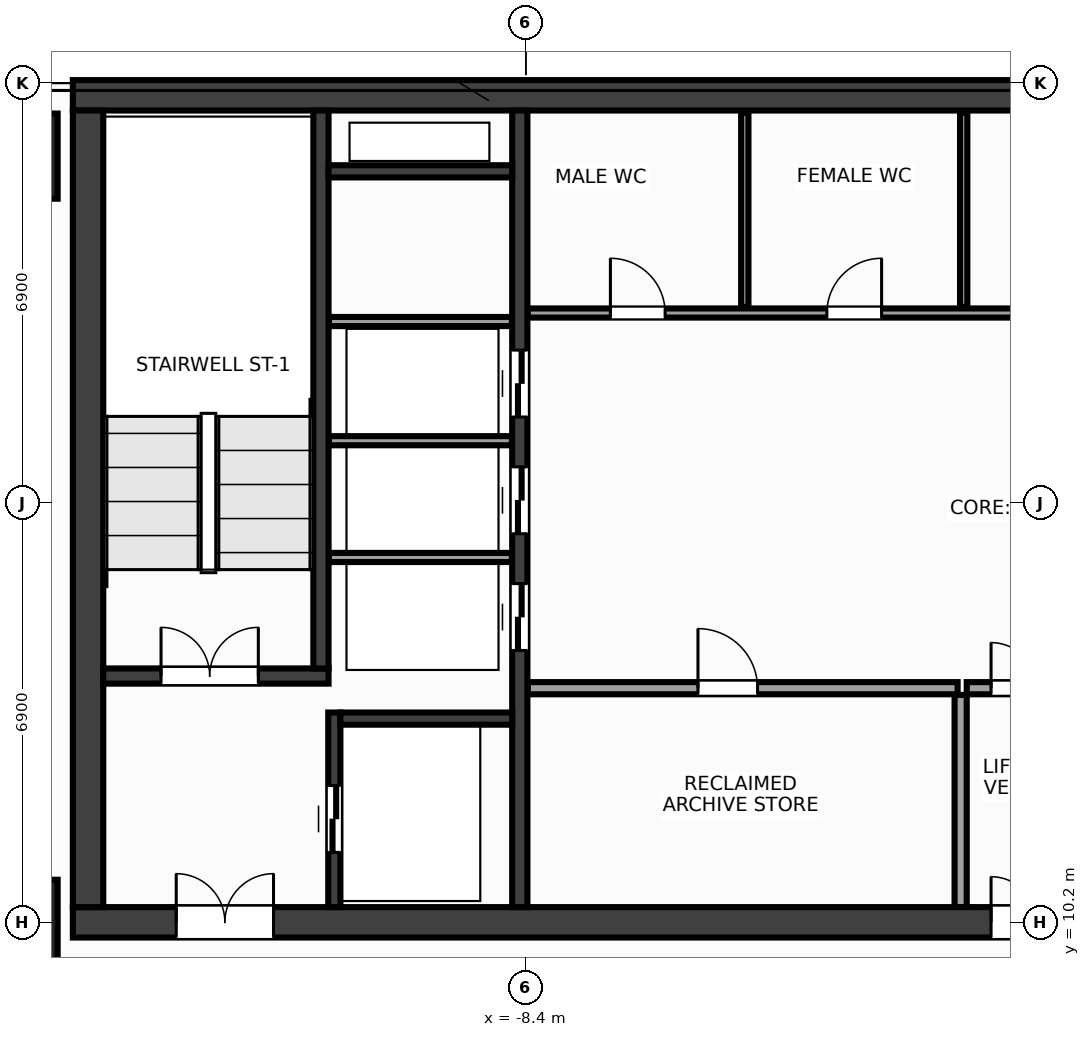
"""IFC4 building model, lengths in metres.
Left out: names, types, materials, properties, quantities, classifications, styles, units other than length and angle.
Written with IfcOpenShell. Run it as: python <this file> out.ifc"""

import sys

from ifc_helpers import new_model, si_unit, direction, frame, frame_2d, origin, origin_2d, place, context, subcontext, project, spatial, rectangle, extrude, source, transform, mapped, element, fill, save


model = new_model("IFC4")
c1 = context("Model", 3, precision=1e-05, world=origin(), true_north=direction((0.0, 1.0)))
c2 = subcontext(c1, "Body", "Model", "MODEL_VIEW")
j1 = project(units=[si_unit("LENGTHUNIT", "METRE"), si_unit("PLANEANGLEUNIT", "RADIAN")], contexts=[c1])
p1 = place(None, origin())
s1 = spatial("IfcSite", under=j1, at=p1, CompositionType="ELEMENT")
p2 = place(p1, origin())
s2 = spatial("IfcBuilding", under=s1, at=p2, CompositionType="ELEMENT")
p3 = place(p2, frame((0.0, 0.0, 200.0)))
s3 = spatial("IfcBuildingStorey", under=s2, at=p3, CompositionType="ELEMENT", Elevation=200.0)
m1 = source(origin(), c2, "Body", "SweptSolid", [
    extrude(rectangle(XDim=31.7, YDim=0.5, at=frame_2d((15.85, 0.0))), origin(), (0.0, 0.0, 1.0), 3.6),
])
p4 = place(p3, frame((-15.85, 23.8, 0.0), z_axis=(0.0, 0.0, 1.0), x_axis=(1.0, 0.0, 0.0)))
e1 = element("IfcWall", 1, at=p4, inside=s3, PredefinedType="SHEAR", context=c2, shape_type="MappedRepresentation", body=[
    mapped(m1, transform((0.0, 0.0, 0.0), x_axis=(1.0, 0.0, 0.0), y_axis=(0.0, 1.0, 0.0), z_axis=(0.0, 0.0, 1.0), scale=1.0)),
])
p5 = place(p3, frame((-15.85, 10.2, 0.0), z_axis=(0.0, 0.0, 1.0), x_axis=(1.0, 0.0, 0.0)))
e2 = element("IfcWall", 2, at=p5, inside=s3, PredefinedType="SHEAR", context=c2, shape_type="MappedRepresentation", body=[
    mapped(m1, transform((0.0, 0.0, 0.0), x_axis=(1.0, 0.0, 0.0), y_axis=(0.0, 1.0, 0.0), z_axis=(0.0, 0.0, 1.0), scale=1.0)),
])
p6 = place(p5, frame((1.7, 0.0, 0.0)))
e3 = element("IfcOpeningElement", 3, at=p6, cuts=e2, PredefinedType="OPENING", context=c2, shape_type="SweptSolid", body=[
    extrude(rectangle(XDim=1.6, YDim=2.15, at=frame_2d((0.8, 1.075))), frame((0.0, 0.262, 0.0), z_axis=(0.0, -1.0, 0.0), x_axis=(1.0, 0.0, 0.0)), (0.0, 0.0, 1.0), 0.524),
])
p7 = place(p5, frame((28.4, 0.0, 0.0)))
e4 = element("IfcOpeningElement", 4, at=p7, cuts=e2, PredefinedType="OPENING", context=c2, shape_type="SweptSolid", body=[
    extrude(rectangle(XDim=1.6, YDim=2.15, at=frame_2d((0.8, 1.075))), frame((0.0, 0.262, 0.0), z_axis=(0.0, -1.0, 0.0), x_axis=(1.0, 0.0, 0.0)), (0.0, 0.0, 1.0), 0.524),
])
p8 = place(p5, frame((15.1, 0.0, 0.0)))
e5 = element("IfcOpeningElement", 5, at=p8, cuts=e2, PredefinedType="OPENING", context=c2, shape_type="SweptSolid", body=[
    extrude(rectangle(XDim=1.5, YDim=2.2, at=frame_2d((0.75, 1.1))), frame((0.0, 0.262, 0.0), z_axis=(0.0, -1.0, 0.0), x_axis=(1.0, 0.0, 0.0)), (0.0, 0.0, 1.0), 0.524),
])
m2 = source(origin(), c2, "Body", "SweptSolid", [
    extrude(rectangle(XDim=13.1, YDim=0.5, at=frame_2d((6.55, 0.0))), origin(), (0.0, 0.0, 1.0), 3.6),
])
p9 = place(p3, frame((-15.6, 10.45, 0.0), z_axis=(0.0, 0.0, 1.0), x_axis=(0.0, 1.0, 0.0)))
e6 = element("IfcWall", 6, at=p9, inside=s3, PredefinedType="SHEAR", context=c2, shape_type="MappedRepresentation", body=[
    mapped(m2, transform((0.0, 0.0, 0.0), x_axis=(1.0, 0.0, 0.0), y_axis=(0.0, 1.0, 0.0), z_axis=(0.0, 0.0, 1.0), scale=1.0)),
])
m3 = source(origin(), c2, "Body", "SweptSolid", [
    extrude(rectangle(XDim=13.1, YDim=0.25, at=frame_2d((6.55, 0.0))), origin(), (0.0, 0.0, 1.0), 3.6),
])
p10 = place(p3, frame((-8.5, 10.45, 0.0), z_axis=(0.0, 0.0, 1.0), x_axis=(0.0, 1.0, 0.0)))
e7 = element("IfcWall", 7, at=p10, inside=s3, PredefinedType="SHEAR", context=c2, shape_type="MappedRepresentation", body=[
    mapped(m3, transform((0.0, 0.0, 0.0), x_axis=(1.0, 0.0, 0.0), y_axis=(0.0, 1.0, 0.0), z_axis=(0.0, 0.0, 1.0), scale=1.0)),
])
p11 = place(p10, frame((4.22, 0.0, 0.0)))
e8 = element("IfcOpeningElement", 8, at=p11, cuts=e7, PredefinedType="OPENING", context=c2, shape_type="SweptSolid", body=[
    extrude(rectangle(XDim=1.1, YDim=2.15, at=frame_2d((0.55, 1.075))), frame((0.0, 0.137, 0.0), z_axis=(0.0, -1.0, 0.0), x_axis=(1.0, 0.0, 0.0)), (0.0, 0.0, 1.0), 0.274),
])
p12 = place(p10, frame((6.14, 0.0, 0.0)))
e9 = element("IfcOpeningElement", 9, at=p12, cuts=e7, PredefinedType="OPENING", context=c2, shape_type="SweptSolid", body=[
    extrude(rectangle(XDim=1.1, YDim=2.15, at=frame_2d((0.55, 1.075))), frame((0.0, 0.137, 0.0), z_axis=(0.0, -1.0, 0.0), x_axis=(1.0, 0.0, 0.0)), (0.0, 0.0, 1.0), 0.274),
])
p13 = place(p10, frame((8.06, 0.0, 0.0)))
e10 = element("IfcOpeningElement", 10, at=p13, cuts=e7, PredefinedType="OPENING", context=c2, shape_type="SweptSolid", body=[
    extrude(rectangle(XDim=1.1, YDim=2.15, at=frame_2d((0.55, 1.075))), frame((0.0, 0.137, 0.0), z_axis=(0.0, -1.0, 0.0), x_axis=(1.0, 0.0, 0.0)), (0.0, 0.0, 1.0), 0.274),
])
m4 = source(origin(), c2, "Body", "SweptSolid", [
    extrude(rectangle(XDim=3.705, YDim=0.25, at=frame_2d((1.853, 0.0))), origin(), (0.0, 0.0, 1.0), 3.6),
])
p14 = place(p3, frame((-15.35, 14.25, 0.0), z_axis=(0.0, 0.0, 1.0), x_axis=(1.0, 0.0, 0.0)))
e11 = element("IfcWall", 11, at=p14, inside=s3, PredefinedType="SHEAR", context=c2, shape_type="MappedRepresentation", body=[
    mapped(m4, transform((0.0, 0.0, 0.0), x_axis=(1.0, 0.0, 0.0), y_axis=(0.0, 1.0, 0.0), z_axis=(0.0, 0.0, 1.0), scale=1.0)),
])
p15 = place(p14, frame((0.95, 0.0, 0.0)))
e12 = element("IfcOpeningElement", 12, at=p15, cuts=e11, PredefinedType="OPENING", context=c2, shape_type="SweptSolid", body=[
    extrude(rectangle(XDim=1.6, YDim=2.15, at=frame_2d((0.8, 1.075))), frame((0.0, 0.137, 0.0), z_axis=(0.0, -1.0, 0.0), x_axis=(1.0, 0.0, 0.0)), (0.0, 0.0, 1.0), 0.274),
])
m5 = source(origin(), c2, "Body", "SweptSolid", [
    extrude(rectangle(XDim=9.175, YDim=0.25, at=frame_2d((4.587, 0.0))), origin(), (0.0, 0.0, 1.0), 3.6),
])
p16 = place(p3, frame((-11.77, 14.375, 0.0), z_axis=(0.0, 0.0, 1.0), x_axis=(0.0, 1.0, 0.0)))
e13 = element("IfcWall", 13, at=p16, inside=s3, PredefinedType="SHEAR", context=c2, shape_type="MappedRepresentation", body=[
    mapped(m5, transform((0.0, 0.0, 0.0), x_axis=(1.0, 0.0, 0.0), y_axis=(0.0, 1.0, 0.0), z_axis=(0.0, 0.0, 1.0), scale=1.0)),
])
m6 = source(origin(), c2, "Body", "SweptSolid", [
    extrude(rectangle(XDim=3.2, YDim=0.2, at=frame_2d((1.6, 0.0))), origin(), (0.0, 0.0, 1.0), 3.6),
])
p17 = place(p3, frame((-11.55, 10.45, 0.0), z_axis=(0.0, 0.0, 1.0), x_axis=(0.0, 1.0, 0.0)))
e14 = element("IfcWall", 14, at=p17, inside=s3, PredefinedType="SHEAR", context=c2, shape_type="MappedRepresentation", body=[
    mapped(m6, transform((0.0, 0.0, 0.0), x_axis=(1.0, 0.0, 0.0), y_axis=(0.0, 1.0, 0.0), z_axis=(0.0, 0.0, 1.0), scale=1.0)),
])
p18 = place(p17, frame((0.9, 0.0, 0.0)))
e15 = element("IfcOpeningElement", 15, at=p18, cuts=e14, PredefinedType="OPENING", context=c2, shape_type="SweptSolid", body=[
    extrude(rectangle(XDim=1.1, YDim=2.15, at=frame_2d((0.55, 1.075))), frame((0.0, 0.112, 0.0), z_axis=(0.0, -1.0, 0.0), x_axis=(1.0, 0.0, 0.0)), (0.0, 0.0, 1.0), 0.224),
])
m7 = source(origin(), c2, "Body", "SweptSolid", [
    extrude(rectangle(XDim=2.825, YDim=0.2, at=frame_2d((1.413, 0.0))), origin(), (0.0, 0.0, 1.0), 3.6),
])
p19 = place(p3, frame((-11.45, 13.55, 0.0), z_axis=(0.0, 0.0, 1.0), x_axis=(1.0, 0.0, 0.0)))
e16 = element("IfcWall", 16, at=p19, inside=s3, PredefinedType="SHEAR", context=c2, shape_type="MappedRepresentation", body=[
    mapped(m7, transform((0.0, 0.0, 0.0), x_axis=(1.0, 0.0, 0.0), y_axis=(0.0, 1.0, 0.0), z_axis=(0.0, 0.0, 1.0), scale=1.0)),
])
m8 = source(origin(), c2, "Body", "SweptSolid", [
    extrude(rectangle(XDim=3.02, YDim=0.2, at=frame_2d((1.51, 0.0))), origin(), (0.0, 0.0, 1.0), 3.6),
])
p20 = place(p3, frame((-11.645, 22.55, 0.0), z_axis=(0.0, 0.0, 1.0), x_axis=(1.0, 0.0, 0.0)))
e17 = element("IfcWall", 17, at=p20, inside=s3, PredefinedType="SHEAR", context=c2, shape_type="MappedRepresentation", body=[
    mapped(m8, transform((0.0, 0.0, 0.0), x_axis=(1.0, 0.0, 0.0), y_axis=(0.0, 1.0, 0.0), z_axis=(0.0, 0.0, 1.0), scale=1.0)),
])
m9 = source(origin(), c2, "Body", "SweptSolid", [
    extrude(rectangle(XDim=1.4, YDim=1.4, at=origin_2d()), origin(), (0.0, 0.0, 1.0), 3.6),
])
for number, where, z_axis, x_axis in (
    (18, (-16.8, 10.2, 0.0), (0.0, 0.0, 1.0), (1.0, 0.0, 0.0)),
    (19, (-16.8, 22.8, 0.0), (0.0, 0.0, 1.0), (1.0, 0.0, 0.0)),
):
    element("IfcColumn", number, at=place(p3, frame(where, z_axis=z_axis, x_axis=x_axis)), inside=s3, PredefinedType="COLUMN", context=c2, shape_type="MappedRepresentation", body=[
        mapped(m9, transform((0.0, 0.0, 0.0), x_axis=(1.0, 0.0, 0.0), y_axis=(0.0, 1.0, 0.0), z_axis=(0.0, 0.0, 1.0), scale=1.0)),
    ])
m10 = source(origin(), c2, "Body", "SweptSolid", [
    extrude(rectangle(XDim=3.01, YDim=0.15, at=frame_2d((1.505, 0.0))), origin(), (0.0, 0.0, 1.0), 3.38),
])
for number, where, z_axis, x_axis in (
    (20, (-11.64, 16.2, 0.0), (0.0, 0.0, 1.0), (1.0, 0.0, 0.0)),
    (21, (-11.64, 18.12, 0.0), (0.0, 0.0, 1.0), (1.0, 0.0, 0.0)),
    (22, (-11.64, 20.08, 0.0), (0.0, 0.0, 1.0), (1.0, 0.0, 0.0)),
):
    element("IfcWall", number, at=place(p3, frame(where, z_axis=z_axis, x_axis=x_axis)), inside=s3, PredefinedType="PARTITIONING", context=c2, shape_type="MappedRepresentation", body=[
        mapped(m10, transform((0.0, 0.0, 0.0), x_axis=(1.0, 0.0, 0.0), y_axis=(0.0, 1.0, 0.0), z_axis=(0.0, 0.0, 1.0), scale=1.0)),
    ])
m11 = source(origin(), c2, "Body", "SweptSolid", [
    extrude(rectangle(XDim=7.07, YDim=0.2, at=frame_2d((3.535, 0.0))), origin(), (0.0, 0.0, 1.0), 3.38),
])
p21 = place(p3, frame((-8.37, 14.05, 0.0), z_axis=(0.0, 0.0, 1.0), x_axis=(1.0, 0.0, 0.0)))
e23 = element("IfcWall", 23, at=p21, inside=s3, PredefinedType="PARTITIONING", context=c2, shape_type="MappedRepresentation", body=[
    mapped(m11, transform((0.0, 0.0, 0.0), x_axis=(1.0, 0.0, 0.0), y_axis=(0.0, 1.0, 0.0), z_axis=(0.0, 0.0, 1.0), scale=1.0)),
])
p22 = place(p21, frame((2.8, 0.0, 0.0)))
e24 = element("IfcOpeningElement", 24, at=p22, cuts=e23, PredefinedType="OPENING", context=c2, shape_type="SweptSolid", body=[
    extrude(rectangle(XDim=0.98, YDim=2.15, at=frame_2d((0.49, 1.075))), frame((0.0, 0.112, 0.0), z_axis=(0.0, -1.0, 0.0), x_axis=(1.0, 0.0, 0.0)), (0.0, 0.0, 1.0), 0.224),
])
m12 = source(origin(), c2, "Body", "SweptSolid", [
    extrude(rectangle(XDim=3.49, YDim=0.2, at=frame_2d((1.745, 0.0))), origin(), (0.0, 0.0, 1.0), 3.38),
])
p23 = place(p3, frame((-1.25, 10.45, 0.0), z_axis=(0.0, 0.0, 1.0), x_axis=(0.0, 1.0, 0.0)))
e25 = element("IfcWall", 25, at=p23, inside=s3, PredefinedType="PARTITIONING", context=c2, shape_type="MappedRepresentation", body=[
    mapped(m12, transform((0.0, 0.0, 0.0), x_axis=(1.0, 0.0, 0.0), y_axis=(0.0, 1.0, 0.0), z_axis=(0.0, 0.0, 1.0), scale=1.0)),
])
m13 = source(origin(), c2, "Body", "SweptSolid", [
    extrude(rectangle(XDim=2.3, YDim=0.2, at=frame_2d((1.15, 0.0))), origin(), (0.0, 0.0, 1.0), 3.38),
])
p24 = place(p3, frame((-1.15, 14.05, 0.0), z_axis=(0.0, 0.0, 1.0), x_axis=(1.0, 0.0, 0.0)))
e26 = element("IfcWall", 26, at=p24, inside=s3, PredefinedType="PARTITIONING", context=c2, shape_type="MappedRepresentation", body=[
    mapped(m13, transform((0.0, 0.0, 0.0), x_axis=(1.0, 0.0, 0.0), y_axis=(0.0, 1.0, 0.0), z_axis=(0.0, 0.0, 1.0), scale=1.0)),
])
p25 = place(p24, frame((0.4, 0.0, 0.0)))
e27 = element("IfcOpeningElement", 27, at=p25, cuts=e26, PredefinedType="OPENING", context=c2, shape_type="SweptSolid", body=[
    extrude(rectangle(XDim=1.5, YDim=2.2, at=frame_2d((0.75, 1.1))), frame((0.0, 0.112, 0.0), z_axis=(0.0, -1.0, 0.0), x_axis=(1.0, 0.0, 0.0)), (0.0, 0.0, 1.0), 0.224),
])
m14 = source(origin(), c2, "Body", "SweptSolid", [
    extrude(rectangle(XDim=14.59, YDim=0.15, at=frame_2d((7.295, 0.0))), origin(), (0.0, 0.0, 1.0), 3.38),
])
p26 = place(p3, frame((-8.37, 20.22, 0.0), z_axis=(0.0, 0.0, 1.0), x_axis=(1.0, 0.0, 0.0)))
e28 = element("IfcWall", 28, at=p26, inside=s3, PredefinedType="PARTITIONING", context=c2, shape_type="MappedRepresentation", body=[
    mapped(m14, transform((0.0, 0.0, 0.0), x_axis=(1.0, 0.0, 0.0), y_axis=(0.0, 1.0, 0.0), z_axis=(0.0, 0.0, 1.0), scale=1.0)),
])
p27 = place(p26, frame((1.36, 0.0, 0.0)))
e29 = element("IfcOpeningElement", 29, at=p27, cuts=e28, PredefinedType="OPENING", context=c2, shape_type="SweptSolid", body=[
    extrude(rectangle(XDim=0.9, YDim=2.15, at=frame_2d((0.45, 1.075))), frame((0.0, 0.087, 0.0), z_axis=(0.0, -1.0, 0.0), x_axis=(1.0, 0.0, 0.0)), (0.0, 0.0, 1.0), 0.174),
])
p28 = place(p26, frame((4.92, 0.0, 0.0)))
e30 = element("IfcOpeningElement", 30, at=p28, cuts=e28, PredefinedType="OPENING", context=c2, shape_type="SweptSolid", body=[
    extrude(rectangle(XDim=0.9, YDim=2.15, at=frame_2d((0.45, 1.075))), frame((0.0, 0.087, 0.0), z_axis=(0.0, -1.0, 0.0), x_axis=(1.0, 0.0, 0.0)), (0.0, 0.0, 1.0), 0.174),
])
p29 = place(p26, frame((10.37, 0.0, 0.0)))
e31 = element("IfcOpeningElement", 31, at=p29, cuts=e28, PredefinedType="OPENING", context=c2, shape_type="SweptSolid", body=[
    extrude(rectangle(XDim=0.9, YDim=2.15, at=frame_2d((0.45, 1.075))), frame((0.0, 0.087, 0.0), z_axis=(0.0, -1.0, 0.0), x_axis=(1.0, 0.0, 0.0)), (0.0, 0.0, 1.0), 0.174),
])
m15 = source(origin(), c2, "Body", "SweptSolid", [
    extrude(rectangle(XDim=3.19, YDim=0.12, at=frame_2d((1.595, 0.0))), origin(), (0.0, 0.0, 1.0), 3.38),
])
for number, where, z_axis, x_axis in (
    (32, (-4.8, 20.32, 0.0), (0.0, 0.0, 1.0), (0.0, 1.0, 0.0)),
    (33, (-1.2, 20.32, 0.0), (0.0, 0.0, 1.0), (0.0, 1.0, 0.0)),
):
    element("IfcWall", number, at=place(p3, frame(where, z_axis=z_axis, x_axis=x_axis)), inside=s3, PredefinedType="PARTITIONING", context=c2, shape_type="MappedRepresentation", body=[
        mapped(m15, transform((0.0, 0.0, 0.0), x_axis=(1.0, 0.0, 0.0), y_axis=(0.0, 1.0, 0.0), z_axis=(0.0, 0.0, 1.0), scale=1.0)),
    ])
m16 = source(origin(), c2, "Body", "SweptSolid", [
    extrude(rectangle(XDim=1.6, YDim=2.15, at=frame_2d((0.8, 1.075))), frame((0.0, 0.025, 0.0), z_axis=(0.0, -1.0, 0.0), x_axis=(1.0, 0.0, 0.0)), (0.0, 0.0, 1.0), 0.05),
])
p30 = place(p15, origin())
e34 = element("IfcDoor", 34, at=p30, inside=s3, OperationType="DOUBLE_DOOR_SINGLE_SWING", PredefinedType="DOOR", context=c2, shape_type="MappedRepresentation", body=[
    mapped(m16, transform((0.0, 0.0, 0.0), x_axis=(1.0, 0.0, 0.0), y_axis=(0.0, 1.0, 0.0), z_axis=(0.0, 0.0, 1.0), scale=1.0)),
])
fill(e12, e34)
p31 = place(p6, origin())
e35 = element("IfcDoor", 35, at=p31, inside=s3, OperationType="DOUBLE_DOOR_SINGLE_SWING", PredefinedType="DOOR", context=c2, shape_type="MappedRepresentation", body=[
    mapped(m16, transform((0.0, 0.0, 0.0), x_axis=(1.0, 0.0, 0.0), y_axis=(0.0, 1.0, 0.0), z_axis=(0.0, 0.0, 1.0), scale=1.0)),
])
fill(e3, e35)
m17 = source(origin(), c2, "Body", "SweptSolid", [
    extrude(rectangle(XDim=1.1, YDim=2.15, at=frame_2d((0.55, 1.075))), frame((0.0, 0.025, 0.0), z_axis=(0.0, -1.0, 0.0), x_axis=(1.0, 0.0, 0.0)), (0.0, 0.0, 1.0), 0.05),
])
p32 = place(p18, origin())
e36 = element("IfcDoor", 36, at=p32, inside=s3, OperationType="DOUBLE_DOOR_SLIDING", PredefinedType="DOOR", context=c2, shape_type="MappedRepresentation", body=[
    mapped(m17, transform((0.0, 0.0, 0.0), x_axis=(1.0, 0.0, 0.0), y_axis=(0.0, 1.0, 0.0), z_axis=(0.0, 0.0, 1.0), scale=1.0)),
])
fill(e15, e36)
p33 = place(p11, origin())
e37 = element("IfcDoor", 37, at=p33, inside=s3, OperationType="DOUBLE_DOOR_SLIDING", PredefinedType="DOOR", context=c2, shape_type="MappedRepresentation", body=[
    mapped(m17, transform((0.0, 0.0, 0.0), x_axis=(1.0, 0.0, 0.0), y_axis=(0.0, 1.0, 0.0), z_axis=(0.0, 0.0, 1.0), scale=1.0)),
])
fill(e8, e37)
p34 = place(p12, origin())
e38 = element("IfcDoor", 38, at=p34, inside=s3, OperationType="DOUBLE_DOOR_SLIDING", PredefinedType="DOOR", context=c2, shape_type="MappedRepresentation", body=[
    mapped(m17, transform((0.0, 0.0, 0.0), x_axis=(1.0, 0.0, 0.0), y_axis=(0.0, 1.0, 0.0), z_axis=(0.0, 0.0, 1.0), scale=1.0)),
])
fill(e9, e38)
p35 = place(p13, origin())
e39 = element("IfcDoor", 39, at=p35, inside=s3, OperationType="DOUBLE_DOOR_SLIDING", PredefinedType="DOOR", context=c2, shape_type="MappedRepresentation", body=[
    mapped(m17, transform((0.0, 0.0, 0.0), x_axis=(1.0, 0.0, 0.0), y_axis=(0.0, 1.0, 0.0), z_axis=(0.0, 0.0, 1.0), scale=1.0)),
])
fill(e10, e39)
m18 = source(origin(), c2, "Body", "SweptSolid", [
    extrude(rectangle(XDim=0.98, YDim=2.15, at=frame_2d((0.49, 1.075))), frame((0.0, 0.025, 0.0), z_axis=(0.0, -1.0, 0.0), x_axis=(1.0, 0.0, 0.0)), (0.0, 0.0, 1.0), 0.05),
])
p36 = place(p22, origin())
e40 = element("IfcDoor", 40, at=p36, inside=s3, OperationType="SINGLE_SWING_LEFT", PredefinedType="DOOR", context=c2, shape_type="MappedRepresentation", body=[
    mapped(m18, transform((0.0, 0.0, 0.0), x_axis=(1.0, 0.0, 0.0), y_axis=(0.0, 1.0, 0.0), z_axis=(0.0, 0.0, 1.0), scale=1.0)),
])
fill(e24, e40)
m19 = source(origin(), c2, "Body", "SweptSolid", [
    extrude(rectangle(XDim=1.5, YDim=2.2, at=frame_2d((0.75, 1.1))), frame((0.0, 0.025, 0.0), z_axis=(0.0, -1.0, 0.0), x_axis=(1.0, 0.0, 0.0)), (0.0, 0.0, 1.0), 0.05),
])
p37 = place(p25, origin())
e41 = element("IfcDoor", 41, at=p37, inside=s3, OperationType="DOUBLE_DOOR_SINGLE_SWING", PredefinedType="DOOR", context=c2, shape_type="MappedRepresentation", body=[
    mapped(m19, transform((0.0, 0.0, 0.0), x_axis=(1.0, 0.0, 0.0), y_axis=(0.0, 1.0, 0.0), z_axis=(0.0, 0.0, 1.0), scale=1.0)),
])
fill(e27, e41)
p38 = place(p8, origin())
e42 = element("IfcDoor", 42, at=p38, inside=s3, OperationType="DOUBLE_DOOR_SINGLE_SWING", PredefinedType="DOOR", context=c2, shape_type="MappedRepresentation", body=[
    mapped(m19, transform((0.0, 0.0, 0.0), x_axis=(1.0, 0.0, 0.0), y_axis=(0.0, 1.0, 0.0), z_axis=(0.0, 0.0, 1.0), scale=1.0)),
])
fill(e5, e42)
m20 = source(origin(), c2, "Body", "SweptSolid", [
    extrude(rectangle(XDim=0.9, YDim=2.15, at=frame_2d((0.45, 1.075))), frame((0.0, 0.025, 0.0), z_axis=(0.0, -1.0, 0.0), x_axis=(1.0, 0.0, 0.0)), (0.0, 0.0, 1.0), 0.05),
])
p39 = place(p27, origin())
e43 = element("IfcDoor", 43, at=p39, inside=s3, OperationType="SINGLE_SWING_LEFT", PredefinedType="DOOR", context=c2, shape_type="MappedRepresentation", body=[
    mapped(m20, transform((0.0, 0.0, 0.0), x_axis=(1.0, 0.0, 0.0), y_axis=(0.0, 1.0, 0.0), z_axis=(0.0, 0.0, 1.0), scale=1.0)),
])
fill(e29, e43)
p40 = place(p28, origin())
e44 = element("IfcDoor", 44, at=p40, inside=s3, OperationType="SINGLE_SWING_RIGHT", PredefinedType="DOOR", context=c2, shape_type="MappedRepresentation", body=[
    mapped(m20, transform((0.0, 0.0, 0.0), x_axis=(1.0, 0.0, 0.0), y_axis=(0.0, 1.0, 0.0), z_axis=(0.0, 0.0, 1.0), scale=1.0)),
])
fill(e30, e44)
save(model, sys.argv[1])
